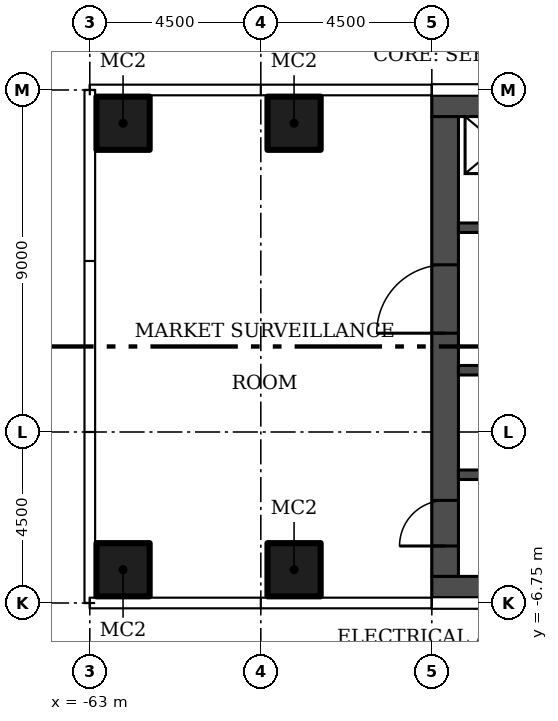
"""IFC4 building model, lengths in metres.
Left out: names, types, materials, properties, quantities, classifications, styles, units other than length and angle.
Written with IfcOpenShell. Run it as: python <this file> out.ifc"""

import sys

from ifc_helpers import new_model, si_unit, direction, frame, frame_2d, origin, origin_2d, place, context, subcontext, project, spatial, rectangle, hollow_rectangle, extrude, element, fill, save


model = new_model("IFC4")
c1 = context("Model", 3, precision=1e-05, world=origin(), true_north=direction((0.0, 1.0)))
c2 = subcontext(c1, "Body", "Model", "MODEL_VIEW")
j1 = project(units=[si_unit("LENGTHUNIT", "METRE"), si_unit("PLANEANGLEUNIT", "RADIAN")], contexts=[c1])
p1 = place(None, origin())
s1 = spatial("IfcSite", under=j1, at=p1, CompositionType="ELEMENT")
p2 = place(p1, origin())
s2 = spatial("IfcBuilding", under=s1, at=p2, CompositionType="ELEMENT")
p3 = place(p2, frame((0.0, 0.0, 57.6)))
s3 = spatial("IfcBuildingStorey", under=s2, at=p3, CompositionType="ELEMENT", Elevation=57.6)
for number, where in (
    (1, (-57.625, -5.875, 0.0)),
    (2, (-62.125, -5.875, 0.0)),
    (3, (-57.625, 5.875, 0.0)),
    (4, (-62.125, 5.875, 0.0)),
):
    element("IfcColumn", number, at=place(p3, frame(where)), inside=s3, PredefinedType="COLUMN", context=c2, shape_type="SweptSolid", body=[
        extrude(hollow_rectangle(XDim=1.4, YDim=1.4, WallThickness=0.05, at=origin_2d()), origin(), (0.0, 0.0, 1.0), 3.55),
    ])
for number, where, z_axis, x_axis in (
    (5, (-40.5, -6.4, 0.0), (0.0, 0.0, 1.0), (-1.0, 0.0, 0.0)),
    (6, (-40.5, 6.4, 0.0), (0.0, 0.0, 1.0), (-1.0, 0.0, 0.0)),
):
    element("IfcWall", number, at=place(p3, frame(where, z_axis=z_axis, x_axis=x_axis)), inside=s3, PredefinedType="SHEAR", context=c2, shape_type="SweptSolid", body=[
        extrude(rectangle(XDim=13.5, YDim=0.7, at=frame_2d((6.75, 0.0))), origin(), (0.0, 0.0, 1.0), 3.55),
    ])
p4 = place(p3, frame((-53.65, -6.05, 0.0), z_axis=(0.0, 0.0, 1.0), x_axis=(0.0, 1.0, 0.0)))
e7 = element("IfcWall", 7, at=p4, inside=s3, PredefinedType="SHEAR", context=c2, shape_type="SweptSolid", body=[
    extrude(rectangle(XDim=12.1, YDim=0.7, at=frame_2d((6.05, 0.0))), origin(), (0.0, 0.0, 1.0), 3.55),
])
p5 = place(p4, frame((0.8, 0.0, 0.0)))
e8 = element("IfcOpeningElement", 8, at=p5, cuts=e7, PredefinedType="OPENING", context=c2, shape_type="SweptSolid", body=[
    extrude(rectangle(XDim=1.2, YDim=2.1, at=frame_2d((0.6, 1.05))), frame((0.0, 0.36, 0.0), z_axis=(0.0, -1.0, 0.0), x_axis=(1.0, 0.0, 0.0)), (0.0, 0.0, 1.0), 0.72),
])
p6 = place(p4, frame((6.4, 0.0, 0.0)))
e9 = element("IfcOpeningElement", 9, at=p6, cuts=e7, PredefinedType="OPENING", context=c2, shape_type="SweptSolid", body=[
    extrude(rectangle(XDim=1.8, YDim=2.4, at=frame_2d((0.9, 1.2))), frame((0.0, 0.36, 0.0), z_axis=(0.0, -1.0, 0.0), x_axis=(1.0, 0.0, 0.0)), (0.0, 0.0, 1.0), 0.72),
])
p7 = place(p3, frame((-41.2, -3.375, 0.0), z_axis=(0.0, 0.0, 1.0), x_axis=(-1.0, 0.0, 0.0)))
e10 = element("IfcWall", 10, at=p7, inside=s3, PredefinedType="SHEAR", context=c2, shape_type="SweptSolid", body=[
    extrude(rectangle(XDim=12.1, YDim=0.25, at=frame_2d((6.05, 0.0))), origin(), (0.0, 0.0, 1.0), 3.55),
])
p8 = place(p7, frame((0.05, 0.0, 0.0)))
e11 = element("IfcOpeningElement", 11, at=p8, cuts=e10, PredefinedType="OPENING", context=c2, shape_type="SweptSolid", body=[
    extrude(rectangle(XDim=1.1, YDim=2.1, at=frame_2d((0.55, 1.05))), frame((0.0, 0.135, 0.0), z_axis=(0.0, -1.0, 0.0), x_axis=(1.0, 0.0, 0.0)), (0.0, 0.0, 1.0), 0.27),
])
p9 = place(p3, frame((-41.2, -0.625, 0.0), z_axis=(0.0, 0.0, 1.0), x_axis=(-1.0, 0.0, 0.0)))
e12 = element("IfcWall", 12, at=p9, inside=s3, PredefinedType="SHEAR", context=c2, shape_type="SweptSolid", body=[
    extrude(rectangle(XDim=12.1, YDim=0.25, at=frame_2d((6.05, 0.0))), origin(), (0.0, 0.0, 1.0), 3.55),
])
p10 = place(p9, frame((2.25, 0.0, 0.0)))
e13 = element("IfcOpeningElement", 13, at=p10, cuts=e12, PredefinedType="OPENING", context=c2, shape_type="SweptSolid", body=[
    extrude(rectangle(XDim=1.2, YDim=2.1, at=frame_2d((0.6, 1.05))), frame((0.0, 0.135, 0.0), z_axis=(0.0, -1.0, 0.0), x_axis=(1.0, 0.0, 0.0)), (0.0, 0.0, 1.0), 0.27),
])
p11 = place(p9, frame((10.025, 0.0, 0.0)))
e14 = element("IfcOpeningElement", 14, at=p11, cuts=e12, PredefinedType="OPENING", context=c2, shape_type="SweptSolid", body=[
    extrude(rectangle(XDim=0.9, YDim=2.1, at=frame_2d((0.45, 1.05))), frame((0.0, 0.135, 0.0), z_axis=(0.0, -1.0, 0.0), x_axis=(1.0, 0.0, 0.0)), (0.0, 0.0, 1.0), 0.27),
])
p12 = place(p3, frame((-48.5, 3.125, 0.0), z_axis=(0.0, 0.0, 1.0), x_axis=(-1.0, 0.0, 0.0)))
e15 = element("IfcWall", 15, at=p12, inside=s3, PredefinedType="SHEAR", context=c2, shape_type="SweptSolid", body=[
    extrude(rectangle(XDim=4.8, YDim=0.25, at=frame_2d((2.4, 0.0))), origin(), (0.0, 0.0, 1.0), 3.55),
])
p13 = place(p12, frame((0.775, 0.0, 0.0)))
e16 = element("IfcOpeningElement", 16, at=p13, cuts=e15, PredefinedType="OPENING", context=c2, shape_type="SweptSolid", body=[
    extrude(rectangle(XDim=1.1, YDim=2.1, at=frame_2d((0.55, 1.05))), frame((0.0, 0.135, 0.0), z_axis=(0.0, -1.0, 0.0), x_axis=(1.0, 0.0, 0.0)), (0.0, 0.0, 1.0), 0.27),
])
p14 = place(p5, origin())
e17 = element("IfcDoor", 17, at=p14, inside=s3, OperationType="SINGLE_SWING_LEFT", PredefinedType="DOOR", context=c2, shape_type="SweptSolid", body=[
    extrude(rectangle(XDim=1.2, YDim=2.1, at=frame_2d((0.6, 1.05))), frame((0.0, 0.025, 0.0), z_axis=(0.0, -1.0, 0.0), x_axis=(1.0, 0.0, 0.0)), (0.0, 0.0, 1.0), 0.05),
])
fill(e8, e17)
p15 = place(p6, origin())
e18 = element("IfcDoor", 18, at=p15, inside=s3, OperationType="DOUBLE_DOOR_SINGLE_SWING", PredefinedType="DOOR", context=c2, shape_type="SweptSolid", body=[
    extrude(rectangle(XDim=1.8, YDim=2.4, at=frame_2d((0.9, 1.2))), frame((0.0, 0.025, 0.0), z_axis=(0.0, -1.0, 0.0), x_axis=(1.0, 0.0, 0.0)), (0.0, 0.0, 1.0), 0.05),
])
fill(e9, e18)
save(model, sys.argv[1])
